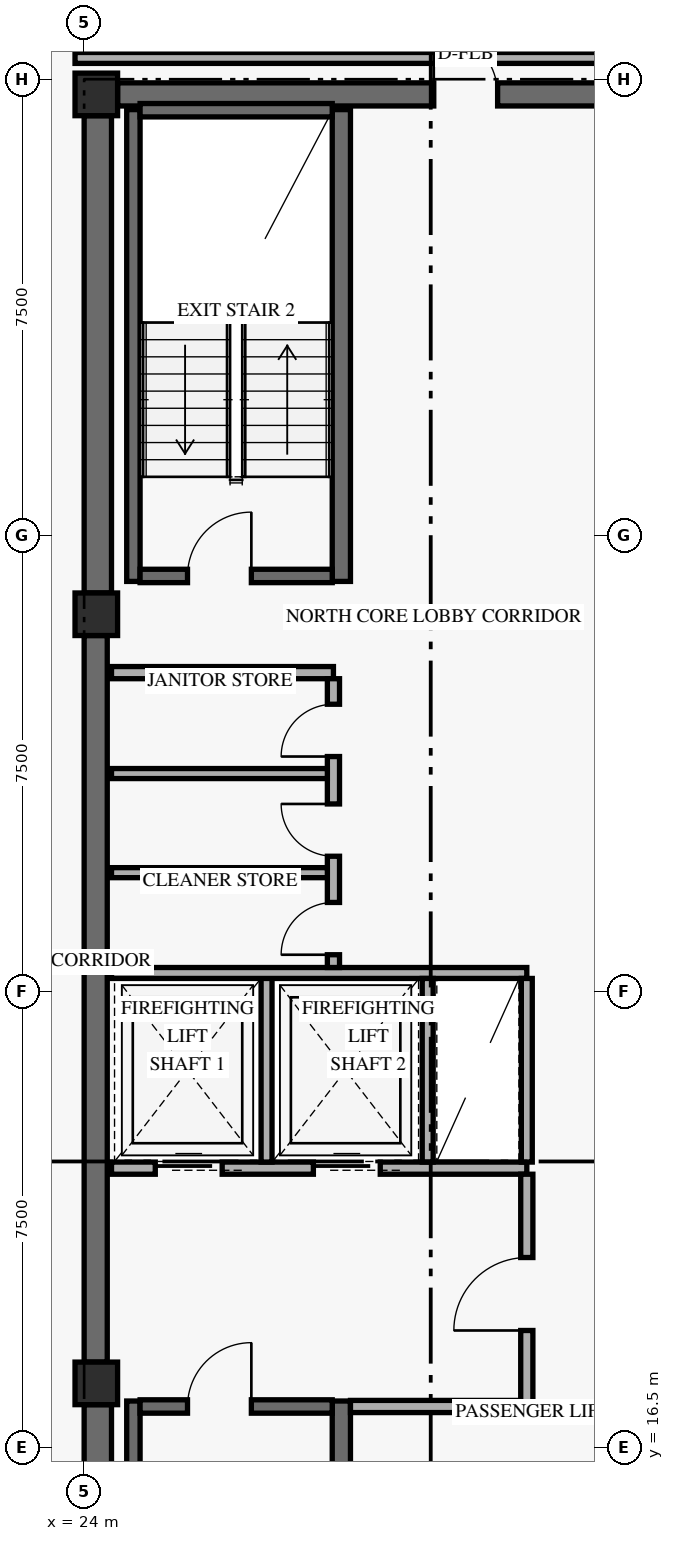
"""IFC4 building model, lengths in metres.
Left out: names, types, materials, properties, quantities, classifications, styles, units other than length and angle.
Written with IfcOpenShell. Run it as: python <this file> out.ifc"""

import sys

from ifc_helpers import new_model, si_unit, direction, frame, frame_2d, origin, origin_2d, place, context, subcontext, project, spatial, rectangle, extrude, element, fill, save


model = new_model("IFC4")
c1 = context("Model", 3, precision=1e-05, world=origin(), true_north=direction((0.0, 1.0)))
c2 = subcontext(c1, "Body", "Model", "MODEL_VIEW")
j1 = project(units=[si_unit("LENGTHUNIT", "METRE"), si_unit("PLANEANGLEUNIT", "RADIAN")], contexts=[c1])
p1 = place(None, origin())
s1 = spatial("IfcSite", under=j1, at=p1, CompositionType="ELEMENT")
p2 = place(p1, origin())
s2 = spatial("IfcBuilding", under=s1, at=p2, CompositionType="ELEMENT")
p3 = place(p2, frame((0.0, 0.0, 184.8)))
s3 = spatial("IfcBuildingStorey", under=s2, at=p3, CompositionType="ELEMENT", Elevation=184.8)
p4 = place(p3, frame((24.225, 9.6, 0.0), z_axis=(0.0, 0.0, 1.0), x_axis=(0.0, 1.0, 0.0)))
e1 = element("IfcWall", 1, at=p4, inside=s3, PredefinedType="SHEAR", context=c2, shape_type="SweptSolid", body=[
    extrude(rectangle(XDim=7.6, YDim=0.45, at=frame_2d((3.8, 0.0))), origin(), (0.0, 0.0, 1.0), 2.748),
])
p5 = place(p3, frame((24.19, 17.9, 0.0), z_axis=(0.0, 0.0, 1.0), x_axis=(0.0, 1.0, 0.0)))
e2 = element("IfcWall", 2, at=p5, inside=s3, PredefinedType="SHEAR", context=c2, shape_type="SweptSolid", body=[
    extrude(rectangle(XDim=11.95, YDim=0.38, at=frame_2d((5.975, 0.0))), origin(), (0.0, 0.0, 1.0), 2.748),
])
p6 = place(p3, frame((24.225, 30.55, 0.0), z_axis=(0.0, 0.0, 1.0), x_axis=(0.0, 1.0, 0.0)))
e3 = element("IfcWall", 3, at=p6, inside=s3, PredefinedType="SHEAR", context=c2, shape_type="SweptSolid", body=[
    extrude(rectangle(XDim=7.85, YDim=0.45, at=frame_2d((3.925, 0.0))), origin(), (0.0, 0.0, 1.0), 2.748),
])
p7 = place(p3, frame((24.55, 38.75, 0.0), z_axis=(0.0, 0.0, 1.0), x_axis=(1.0, 0.0, 0.0)))
e4 = element("IfcWall", 4, at=p7, inside=s3, PredefinedType="SHEAR", context=c2, shape_type="SweptSolid", body=[
    extrude(rectangle(XDim=10.3, YDim=0.38, at=frame_2d((5.15, 0.0))), origin(), (0.0, 0.0, 1.0), 3.36),
])
p8 = place(p7, frame((5.2, 0.0, 0.0)))
e5 = element("IfcOpeningElement", 5, at=p8, cuts=e4, PredefinedType="OPENING", context=c2, shape_type="SweptSolid", body=[
    extrude(rectangle(XDim=1.05, YDim=2.15, at=frame_2d((0.525, 1.075))), frame((0.0, 0.2, 0.0), z_axis=(0.0, -1.0, 0.0), x_axis=(1.0, 0.0, 0.0)), (0.0, 0.0, 1.0), 0.4),
])
p9 = place(p3, frame((24.81, 9.5, 0.0), z_axis=(0.0, 0.0, 1.0), x_axis=(0.0, 1.0, 0.0)))
e6 = element("IfcWall", 6, at=p9, inside=s3, PredefinedType="SHEAR", context=c2, shape_type="SweptSolid", body=[
    extrude(rectangle(XDim=7.76, YDim=0.22, at=frame_2d((3.88, 0.0))), origin(), (0.0, 0.0, 1.0), 3.36),
])
p10 = place(p3, frame((28.23, 9.5, 0.0), z_axis=(0.0, 0.0, 1.0), x_axis=(0.0, 1.0, 0.0)))
e7 = element("IfcWall", 7, at=p10, inside=s3, PredefinedType="SHEAR", context=c2, shape_type="SweptSolid", body=[
    extrude(rectangle(XDim=7.76, YDim=0.3, at=frame_2d((3.88, 0.0))), origin(), (0.0, 0.0, 1.0), 3.36),
])
p11 = place(p3, frame((24.92, 17.17, 0.0), z_axis=(0.0, 0.0, 1.0), x_axis=(1.0, 0.0, 0.0)))
e8 = element("IfcWall", 8, at=p11, inside=s3, PredefinedType="SHEAR", context=c2, shape_type="SweptSolid", body=[
    extrude(rectangle(XDim=3.16, YDim=0.22, at=frame_2d((1.58, 0.0))), origin(), (0.0, 0.0, 1.0), 3.36),
])
p12 = place(p11, frame((0.78, 0.0, 0.0)))
e9 = element("IfcOpeningElement", 9, at=p12, cuts=e8, PredefinedType="OPENING", context=c2, shape_type="SweptSolid", body=[
    extrude(rectangle(XDim=1.05, YDim=2.15, at=frame_2d((0.525, 1.075))), frame((0.0, 0.12, 0.0), z_axis=(0.0, -1.0, 0.0), x_axis=(1.0, 0.0, 0.0)), (0.0, 0.0, 1.0), 0.24),
])
p13 = place(p3, frame((24.81, 30.74, 0.0), z_axis=(0.0, 0.0, 1.0), x_axis=(0.0, 1.0, 0.0)))
e10 = element("IfcWall", 10, at=p13, inside=s3, PredefinedType="SHEAR", context=c2, shape_type="SweptSolid", body=[
    extrude(rectangle(XDim=7.76, YDim=0.22, at=frame_2d((3.88, 0.0))), origin(), (0.0, 0.0, 1.0), 3.36),
])
p14 = place(p3, frame((28.23, 30.74, 0.0), z_axis=(0.0, 0.0, 1.0), x_axis=(0.0, 1.0, 0.0)))
e11 = element("IfcWall", 11, at=p14, inside=s3, PredefinedType="SHEAR", context=c2, shape_type="SweptSolid", body=[
    extrude(rectangle(XDim=7.76, YDim=0.3, at=frame_2d((3.88, 0.0))), origin(), (0.0, 0.0, 1.0), 3.36),
])
p15 = place(p3, frame((24.92, 30.83, 0.0), z_axis=(0.0, 0.0, 1.0), x_axis=(1.0, 0.0, 0.0)))
e12 = element("IfcWall", 12, at=p15, inside=s3, PredefinedType="SHEAR", context=c2, shape_type="SweptSolid", body=[
    extrude(rectangle(XDim=3.16, YDim=0.22, at=frame_2d((1.58, 0.0))), origin(), (0.0, 0.0, 1.0), 3.36),
])
p16 = place(p15, frame((0.78, 0.0, 0.0)))
e13 = element("IfcOpeningElement", 13, at=p16, cuts=e12, PredefinedType="OPENING", context=c2, shape_type="SweptSolid", body=[
    extrude(rectangle(XDim=1.05, YDim=2.15, at=frame_2d((0.525, 1.075))), frame((0.0, 0.12, 0.0), z_axis=(0.0, -1.0, 0.0), x_axis=(1.0, 0.0, 0.0)), (0.0, 0.0, 1.0), 0.24),
])
p17 = place(p3, frame((24.92, 38.49, 0.0), z_axis=(0.0, 0.0, 1.0), x_axis=(1.0, 0.0, 0.0)))
e14 = element("IfcWall", 14, at=p17, inside=s3, PredefinedType="SHEAR", context=c2, shape_type="SweptSolid", body=[
    extrude(rectangle(XDim=3.16, YDim=0.22, at=frame_2d((1.58, 0.0))), origin(), (0.0, 0.0, 1.0), 3.36),
])
for number, where, z_axis, x_axis in (
    (15, (24.2, 17.55, 0.0), (0.0, 0.0, 1.0), (1.0, 0.0, 0.0)),
    (16, (24.2, 30.2, 0.0), (0.0, 0.0, 1.0), (1.0, 0.0, 0.0)),
    (17, (24.2, 38.75, 0.0), (0.0, 0.0, 1.0), (1.0, 0.0, 0.0)),
):
    element("IfcColumn", number, at=place(p3, frame(where, z_axis=z_axis, x_axis=x_axis)), inside=s3, PredefinedType="COLUMN", context=c2, shape_type="SweptSolid", body=[
        extrude(rectangle(XDim=0.7, YDim=0.7, at=origin_2d()), origin(), (0.0, 0.0, 1.0), 3.6),
    ])
p18 = place(p3, frame((24.45, 21.09, 0.0), z_axis=(0.0, 0.0, 1.0), x_axis=(1.0, 0.0, 0.0)))
e18 = element("IfcWall", 18, at=p18, inside=s3, PredefinedType="STANDARD", context=c2, shape_type="SweptSolid", body=[
    extrude(rectangle(XDim=6.83, YDim=0.2, at=frame_2d((3.415, 0.0))), origin(), (0.0, 0.0, 1.0), 3.36),
])
p19 = place(p18, frame((0.72, 0.0, 0.0)))
e19 = element("IfcOpeningElement", 19, at=p19, cuts=e18, PredefinedType="OPENING", context=c2, shape_type="SweptSolid", body=[
    extrude(rectangle(XDim=1.1, YDim=2.2, at=frame_2d((0.55, 1.1))), frame((0.0, 0.11, 0.0), z_axis=(0.0, -1.0, 0.0), x_axis=(1.0, 0.0, 0.0)), (0.0, 0.0, 1.0), 0.22),
])
p20 = place(p18, frame((3.32, 0.0, 0.0)))
e20 = element("IfcOpeningElement", 20, at=p20, cuts=e18, PredefinedType="OPENING", context=c2, shape_type="SweptSolid", body=[
    extrude(rectangle(XDim=1.1, YDim=2.2, at=frame_2d((0.55, 1.1))), frame((0.0, 0.11, 0.0), z_axis=(0.0, -1.0, 0.0), x_axis=(1.0, 0.0, 0.0)), (0.0, 0.0, 1.0), 0.22),
])
p21 = place(p3, frame((28.38, 17.17, 0.0), z_axis=(0.0, 0.0, 1.0), x_axis=(1.0, 0.0, 0.0)))
e21 = element("IfcWall", 21, at=p21, inside=s3, PredefinedType="STANDARD", context=c2, shape_type="SweptSolid", body=[
    extrude(rectangle(XDim=2.9, YDim=0.2, at=frame_2d((1.45, 0.0))), origin(), (0.0, 0.0, 1.0), 3.36),
])
p22 = place(p3, frame((31.28, 17.07, 0.0), z_axis=(0.0, 0.0, 1.0), x_axis=(0.0, 1.0, 0.0)))
e22 = element("IfcWall", 22, at=p22, inside=s3, PredefinedType="STANDARD", context=c2, shape_type="SweptSolid", body=[
    extrude(rectangle(XDim=3.92, YDim=0.2, at=frame_2d((1.96, 0.0))), origin(), (0.0, 0.0, 1.0), 2.73),
])
p23 = place(p22, frame((1.35, 0.0, 0.0)))
e23 = element("IfcOpeningElement", 23, at=p23, cuts=e22, PredefinedType="OPENING", context=c2, shape_type="SweptSolid", body=[
    extrude(rectangle(XDim=1.2, YDim=2.15, at=frame_2d((0.6, 1.075))), frame((0.0, 0.11, 0.0), z_axis=(0.0, -1.0, 0.0), x_axis=(1.0, 0.0, 0.0)), (0.0, 0.0, 1.0), 0.22),
])
p24 = place(p3, frame((27.0, 21.19, 0.0), z_axis=(0.0, 0.0, 1.0), x_axis=(0.0, 1.0, 0.0)))
e24 = element("IfcWall", 24, at=p24, inside=s3, PredefinedType="STANDARD", context=c2, shape_type="SweptSolid", body=[
    extrude(rectangle(XDim=3.11, YDim=0.18, at=frame_2d((1.555, 0.0))), origin(), (0.0, 0.0, 1.0), 3.36),
])
p25 = place(p3, frame((24.45, 24.3, 0.0), z_axis=(0.0, 0.0, 1.0), x_axis=(1.0, 0.0, 0.0)))
e25 = element("IfcWall", 25, at=p25, inside=s3, PredefinedType="STANDARD", context=c2, shape_type="SweptSolid", body=[
    extrude(rectangle(XDim=6.83, YDim=0.18, at=frame_2d((3.415, 0.0))), origin(), (0.0, 0.0, 1.0), 3.36),
])
for number, where, z_axis, x_axis in (
    (26, (29.65, 21.19, 0.0), (0.0, 0.0, 1.0), (0.0, 1.0, 0.0)),
    (27, (31.28, 21.19, 0.0), (0.0, 0.0, 1.0), (0.0, 1.0, 0.0)),
):
    element("IfcWall", number, at=place(p3, frame(where, z_axis=z_axis, x_axis=x_axis)), inside=s3, PredefinedType="STANDARD", context=c2, shape_type="SweptSolid", body=[
        extrude(rectangle(XDim=3.02, YDim=0.18, at=frame_2d((1.51, 0.0))), origin(), (0.0, 0.0, 1.0), 3.36),
    ])
p26 = place(p3, frame((24.45, 29.24, 0.0), z_axis=(0.0, 0.0, 1.0), x_axis=(1.0, 0.0, 0.0)))
e28 = element("IfcWall", 28, at=p26, inside=s3, PredefinedType="STANDARD", context=c2, shape_type="SweptSolid", body=[
    extrude(rectangle(XDim=3.65, YDim=0.2, at=frame_2d((1.825, 0.0))), origin(), (0.0, 0.0, 1.0), 3.36),
])
p27 = place(p3, frame((28.1, 24.39, 0.0), z_axis=(0.0, 0.0, 1.0), x_axis=(0.0, 1.0, 0.0)))
e29 = element("IfcWall", 29, at=p27, inside=s3, PredefinedType="STANDARD", context=c2, shape_type="SweptSolid", body=[
    extrude(rectangle(XDim=4.75, YDim=0.2, at=frame_2d((2.375, 0.0))), origin(), (0.0, 0.0, 1.0), 3.36),
])
p28 = place(p27, frame((0.21, 0.0, 0.0)))
e30 = element("IfcOpeningElement", 30, at=p28, cuts=e29, PredefinedType="OPENING", context=c2, shape_type="SweptSolid", body=[
    extrude(rectangle(XDim=0.86, YDim=2.1, at=frame_2d((0.43, 1.05))), frame((0.0, 0.11, 0.0), z_axis=(0.0, -1.0, 0.0), x_axis=(1.0, 0.0, 0.0)), (0.0, 0.0, 1.0), 0.22),
])
p29 = place(p27, frame((1.83, 0.0, 0.0)))
e31 = element("IfcOpeningElement", 31, at=p29, cuts=e29, PredefinedType="OPENING", context=c2, shape_type="SweptSolid", body=[
    extrude(rectangle(XDim=0.86, YDim=2.1, at=frame_2d((0.43, 1.05))), frame((0.0, 0.11, 0.0), z_axis=(0.0, -1.0, 0.0), x_axis=(1.0, 0.0, 0.0)), (0.0, 0.0, 1.0), 0.22),
])
p30 = place(p27, frame((3.47, 0.0, 0.0)))
e32 = element("IfcOpeningElement", 32, at=p30, cuts=e29, PredefinedType="OPENING", context=c2, shape_type="SweptSolid", body=[
    extrude(rectangle(XDim=0.86, YDim=2.1, at=frame_2d((0.43, 1.05))), frame((0.0, 0.11, 0.0), z_axis=(0.0, -1.0, 0.0), x_axis=(1.0, 0.0, 0.0)), (0.0, 0.0, 1.0), 0.22),
])
for number, where, z_axis, x_axis in (
    (33, (24.45, 25.95, 0.0), (0.0, 0.0, 1.0), (1.0, 0.0, 0.0)),
    (34, (24.45, 27.58, 0.0), (0.0, 0.0, 1.0), (1.0, 0.0, 0.0)),
):
    element("IfcWall", number, at=place(p3, frame(where, z_axis=z_axis, x_axis=x_axis)), inside=s3, PredefinedType="PARTITIONING", context=c2, shape_type="SweptSolid", body=[
        extrude(rectangle(XDim=3.55, YDim=0.165, at=frame_2d((1.775, 0.0))), origin(), (0.0, 0.0, 1.0), 3.36),
    ])
p31 = place(p3, frame((23.85, 39.35, 0.0), z_axis=(0.0, 0.0, 1.0), x_axis=(1.0, 0.0, 0.0)))
e35 = element("IfcWall", 35, at=p31, inside=s3, PredefinedType="STANDARD", context=c2, shape_type="SweptSolid", body=[
    extrude(rectangle(XDim=11.57, YDim=0.18, at=frame_2d((5.785, 0.0))), origin(), (0.0, 0.0, 1.0), 2.73),
])
p32 = place(p12, frame((1.05, 0.0, 0.0), z_axis=(0.0, 0.0, 1.0), x_axis=(-1.0, 0.0, 0.0)))
e36 = element("IfcDoor", 36, at=p32, inside=s3, OperationType="SINGLE_SWING_LEFT", PredefinedType="DOOR", context=c2, shape_type="SweptSolid", body=[
    extrude(rectangle(XDim=1.05, YDim=2.15, at=frame_2d((0.525, 1.075))), frame((0.0, 0.025, 0.0), z_axis=(0.0, -1.0, 0.0), x_axis=(1.0, 0.0, 0.0)), (0.0, 0.0, 1.0), 0.05),
])
fill(e9, e36)
p33 = place(p16, origin())
e37 = element("IfcDoor", 37, at=p33, inside=s3, OperationType="SINGLE_SWING_RIGHT", PredefinedType="DOOR", context=c2, shape_type="SweptSolid", body=[
    extrude(rectangle(XDim=1.05, YDim=2.15, at=frame_2d((0.525, 1.075))), frame((0.0, 0.025, 0.0), z_axis=(0.0, -1.0, 0.0), x_axis=(1.0, 0.0, 0.0)), (0.0, 0.0, 1.0), 0.05),
])
fill(e13, e37)
p34 = place(p19, origin())
e38 = element("IfcDoor", 38, at=p34, inside=s3, OperationType="SLIDING_TO_LEFT", PredefinedType="DOOR", context=c2, shape_type="SweptSolid", body=[
    extrude(rectangle(XDim=1.1, YDim=2.2, at=frame_2d((0.55, 1.1))), frame((0.0, 0.025, 0.0), z_axis=(0.0, -1.0, 0.0), x_axis=(1.0, 0.0, 0.0)), (0.0, 0.0, 1.0), 0.05),
])
fill(e19, e38)
p35 = place(p20, origin())
e39 = element("IfcDoor", 39, at=p35, inside=s3, OperationType="SLIDING_TO_LEFT", PredefinedType="DOOR", context=c2, shape_type="SweptSolid", body=[
    extrude(rectangle(XDim=1.1, YDim=2.2, at=frame_2d((0.55, 1.1))), frame((0.0, 0.025, 0.0), z_axis=(0.0, -1.0, 0.0), x_axis=(1.0, 0.0, 0.0)), (0.0, 0.0, 1.0), 0.05),
])
fill(e20, e39)
p36 = place(p23, origin())
e40 = element("IfcDoor", 40, at=p36, inside=s3, OperationType="SINGLE_SWING_LEFT", PredefinedType="DOOR", context=c2, shape_type="SweptSolid", body=[
    extrude(rectangle(XDim=1.2, YDim=2.15, at=frame_2d((0.6, 1.075))), frame((0.0, 0.025, 0.0), z_axis=(0.0, -1.0, 0.0), x_axis=(1.0, 0.0, 0.0)), (0.0, 0.0, 1.0), 0.05),
])
fill(e23, e40)
p37 = place(p28, origin())
e41 = element("IfcDoor", 41, at=p37, inside=s3, OperationType="SINGLE_SWING_LEFT", PredefinedType="DOOR", context=c2, shape_type="SweptSolid", body=[
    extrude(rectangle(XDim=0.86, YDim=2.1, at=frame_2d((0.43, 1.05))), frame((0.0, 0.025, 0.0), z_axis=(0.0, -1.0, 0.0), x_axis=(1.0, 0.0, 0.0)), (0.0, 0.0, 1.0), 0.05),
])
fill(e30, e41)
p38 = place(p29, origin())
e42 = element("IfcDoor", 42, at=p38, inside=s3, OperationType="SINGLE_SWING_RIGHT", PredefinedType="DOOR", context=c2, shape_type="SweptSolid", body=[
    extrude(rectangle(XDim=0.86, YDim=2.1, at=frame_2d((0.43, 1.05))), frame((0.0, 0.025, 0.0), z_axis=(0.0, -1.0, 0.0), x_axis=(1.0, 0.0, 0.0)), (0.0, 0.0, 1.0), 0.05),
])
fill(e31, e42)
p39 = place(p30, origin())
e43 = element("IfcDoor", 43, at=p39, inside=s3, OperationType="SINGLE_SWING_LEFT", PredefinedType="DOOR", context=c2, shape_type="SweptSolid", body=[
    extrude(rectangle(XDim=0.86, YDim=2.1, at=frame_2d((0.43, 1.05))), frame((0.0, 0.025, 0.0), z_axis=(0.0, -1.0, 0.0), x_axis=(1.0, 0.0, 0.0)), (0.0, 0.0, 1.0), 0.05),
])
fill(e32, e43)
p40 = place(p8, frame((1.05, 0.0, 0.0), z_axis=(0.0, 0.0, 1.0), x_axis=(-1.0, 0.0, 0.0)))
e44 = element("IfcDoor", 44, at=p40, inside=s3, OperationType="SINGLE_SWING_RIGHT", PredefinedType="DOOR", context=c2, shape_type="SweptSolid", body=[
    extrude(rectangle(XDim=1.05, YDim=2.15, at=frame_2d((0.525, 1.075))), frame((0.0, 0.025, 0.0), z_axis=(0.0, -1.0, 0.0), x_axis=(1.0, 0.0, 0.0)), (0.0, 0.0, 1.0), 0.05),
])
fill(e5, e44)
save(model, sys.argv[1])
